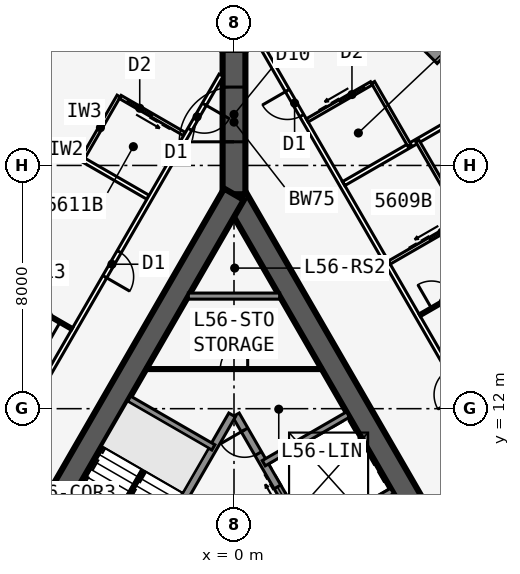
"""IFC4 building model, lengths in metres.
Left out: names, types, materials, properties, quantities, classifications, styles, units other than length and angle.
Written with IfcOpenShell. Run it as: python <this file> out.ifc"""

import sys

from ifc_helpers import new_model, si_unit, direction, frame, frame_2d, origin, place, context, subcontext, project, spatial, rectangle, extrude, element, fill, save


model = new_model("IFC4")
c1 = context("Model", 3, precision=1e-05, world=origin(), true_north=direction((0.0, 1.0)))
c2 = subcontext(c1, "Body", "Model", "MODEL_VIEW")
j1 = project(units=[si_unit("LENGTHUNIT", "METRE"), si_unit("PLANEANGLEUNIT", "RADIAN")], contexts=[c1])
p1 = place(None, origin())
s1 = spatial("IfcSite", under=j1, at=p1, CompositionType="ELEMENT")
p2 = place(p1, origin())
s2 = spatial("IfcBuilding", under=s1, at=p2, CompositionType="ELEMENT")
p3 = place(p2, frame((0.0, 0.0, 211.7)))
s3 = spatial("IfcBuildingStorey", under=s2, at=p3, CompositionType="ELEMENT", Elevation=211.7)
p4 = place(p3, frame((16.5, -9.526, 0.0), z_axis=(0.0, 0.0, 1.0), x_axis=(-0.499999749417, 0.866025548458, 0.0)))
e1 = element("IfcWall", 1, at=p4, inside=s3, PredefinedType="SHEAR", context=c2, shape_type="SweptSolid", body=[
    extrude(rectangle(XDim=33.0, YDim=0.75, at=frame_2d((16.5, 0.0))), origin(), (0.0, 0.0, 1.0), 3.6),
])
p5 = place(p4, frame((14.15, 0.0, 0.0)))
e2 = element("IfcOpeningElement", 2, at=p5, cuts=e1, PredefinedType="OPENING", context=c2, shape_type="SweptSolid", body=[
    extrude(rectangle(XDim=1.8, YDim=2.13, at=frame_2d((0.9, 1.065))), frame((0.0, 0.385, 0.0), z_axis=(0.0, -1.0, 0.0), x_axis=(1.0, 0.0, 0.0)), (0.0, 0.0, 1.0), 0.77),
])
p6 = place(p4, frame((12.6, 0.0, 0.0)))
e3 = element("IfcOpeningElement", 3, at=p6, cuts=e1, PredefinedType="OPENING", context=c2, shape_type="SweptSolid", body=[
    extrude(rectangle(XDim=1.0, YDim=2.13, at=frame_2d((0.5, 1.065))), frame((0.0, 0.385, 0.0), z_axis=(0.0, -1.0, 0.0), x_axis=(1.0, 0.0, 0.0)), (0.0, 0.0, 1.0), 0.77),
])
p7 = place(p3, frame((5.379, 2.586, 0.0), z_axis=(0.0, 0.0, 1.0), x_axis=(-0.500001375892, 0.866024609411, 0.0)))
e4 = element("IfcWall", 4, at=p7, inside=s3, PredefinedType="SOLIDWALL", context=c2, shape_type="SweptSolid", body=[
    extrude(rectangle(XDim=10.633, YDim=0.25, at=frame_2d((5.316, 0.0))), origin(), (0.0, 0.0, 1.0), 3.435),
])
p8 = place(p7, frame((9.164, 0.0, 0.0)))
e5 = element("IfcOpeningElement", 5, at=p8, cuts=e4, PredefinedType="OPENING", context=c2, shape_type="SweptSolid", body=[
    extrude(rectangle(XDim=0.9, YDim=2.13, at=frame_2d((0.45, 1.065))), frame((0.0, 0.135, 0.0), z_axis=(0.0, -1.0, 0.0), x_axis=(1.0, 0.0, 0.0)), (0.0, 0.0, 1.0), 0.27),
])
p9 = place(p7, frame((1.0, 0.0, 0.0)))
e6 = element("IfcOpeningElement", 6, at=p9, cuts=e4, PredefinedType="OPENING", context=c2, shape_type="SweptSolid", body=[
    extrude(rectangle(XDim=1.1, YDim=2.13, at=frame_2d((0.55, 1.065))), frame((0.0, 0.135, 0.0), z_axis=(0.0, -1.0, 0.0), x_axis=(1.0, 0.0, 0.0)), (0.0, 0.0, 1.0), 0.27),
])
p10 = place(p7, frame((3.9, 0.0, 0.0)))
e7 = element("IfcOpeningElement", 7, at=p10, cuts=e4, PredefinedType="OPENING", context=c2, shape_type="SweptSolid", body=[
    extrude(rectangle(XDim=1.1, YDim=2.13, at=frame_2d((0.55, 1.065))), frame((0.0, 0.135, 0.0), z_axis=(0.0, -1.0, 0.0), x_axis=(1.0, 0.0, 0.0)), (0.0, 0.0, 1.0), 0.27),
])
p11 = place(p7, frame((6.8, 0.0, 0.0)))
e8 = element("IfcOpeningElement", 8, at=p11, cuts=e4, PredefinedType="OPENING", context=c2, shape_type="SweptSolid", body=[
    extrude(rectangle(XDim=1.1, YDim=2.13, at=frame_2d((0.55, 1.065))), frame((0.0, 0.135, 0.0), z_axis=(0.0, -1.0, 0.0), x_axis=(1.0, 0.0, 0.0)), (0.0, 0.0, 1.0), 0.27),
])
for number, where, z_axis, x_axis in (
    (9, (2.429, 7.696, 0.0), (0.0, 0.0, 1.0), (0.866, 0.5, 0.0)),
    (10, (0.979, 10.207, 0.0), (0.0, 0.0, 1.0), (0.866, 0.5, 0.0)),
):
    element("IfcWall", number, at=place(p3, frame(where, z_axis=z_axis, x_axis=x_axis)), inside=s3, PredefinedType="SOLIDWALL", context=c2, shape_type="SweptSolid", body=[
        extrude(rectangle(XDim=3.2, YDim=0.2, at=frame_2d((1.6, 0.0))), origin(), (0.0, 0.0, 1.0), 3.435),
    ])
p12 = place(p3, frame((0.0, 19.052, 0.0), z_axis=(0.0, 0.0, 1.0), x_axis=(-0.499999749417, -0.866025548458, 0.0)))
e11 = element("IfcWall", 11, at=p12, inside=s3, PredefinedType="SHEAR", context=c2, shape_type="SweptSolid", body=[
    extrude(rectangle(XDim=33.0, YDim=0.75, at=frame_2d((16.5, 0.0))), origin(), (0.0, 0.0, 1.0), 3.6),
])
p13 = place(p12, frame((14.15, 0.0, 0.0)))
e12 = element("IfcOpeningElement", 12, at=p13, cuts=e11, PredefinedType="OPENING", context=c2, shape_type="SweptSolid", body=[
    extrude(rectangle(XDim=1.8, YDim=2.13, at=frame_2d((0.9, 1.065))), frame((0.0, 0.385, 0.0), z_axis=(0.0, -1.0, 0.0), x_axis=(1.0, 0.0, 0.0)), (0.0, 0.0, 1.0), 0.77),
])
p14 = place(p12, frame((12.6, 0.0, 0.0)))
e13 = element("IfcOpeningElement", 13, at=p14, cuts=e11, PredefinedType="OPENING", context=c2, shape_type="SweptSolid", body=[
    extrude(rectangle(XDim=1.0, YDim=2.13, at=frame_2d((0.5, 1.065))), frame((0.0, 0.385, 0.0), z_axis=(0.0, -1.0, 0.0), x_axis=(1.0, 0.0, 0.0)), (0.0, 0.0, 1.0), 0.77),
])
p15 = place(p3, frame((-0.062, 11.794, 0.0), z_axis=(0.0, 0.0, 1.0), x_axis=(-0.500006680225, -0.86602154692, 0.0)))
e14 = element("IfcWall", 14, at=p15, inside=s3, PredefinedType="SOLIDWALL", context=c2, shape_type="SweptSolid", body=[
    extrude(rectangle(XDim=7.733, YDim=0.25, at=frame_2d((3.866, 0.0))), origin(), (0.0, 0.0, 1.0), 3.435),
])
p16 = place(p3, frame((-0.679, 10.727, 0.0), z_axis=(0.0, 0.0, 1.0), x_axis=(-0.866008981251, 0.500028443584, 0.0)))
e15 = element("IfcWall", 15, at=p16, inside=s3, PredefinedType="SOLIDWALL", context=c2, shape_type="SweptSolid", body=[
    extrude(rectangle(XDim=3.2, YDim=0.2, at=frame_2d((1.6, 0.0))), origin(), (0.0, 0.0, 1.0), 3.435),
])
p17 = place(p3, frame((0.0, 19.052, 0.0), z_axis=(0.0, 0.0, 1.0), x_axis=(0.0, 1.0, 0.0)))
e16 = element("IfcWall", 16, at=p17, inside=s3, PredefinedType="SHEAR", context=c2, shape_type="SweptSolid", body=[
    extrude(rectangle(XDim=4.746, YDim=0.75, at=frame_2d((2.373, 0.0))), origin(), (0.0, 0.0, 1.0), 3.6),
])
p18 = place(p17, frame((1.725, 0.0, 0.0)))
e17 = element("IfcOpeningElement", 17, at=p18, cuts=e16, PredefinedType="OPENING", context=c2, shape_type="SweptSolid", body=[
    extrude(rectangle(XDim=1.8, YDim=2.13, at=frame_2d((0.9, 1.065))), frame((0.0, 0.385, 0.0), z_axis=(0.0, -1.0, 0.0), x_axis=(1.0, 0.0, 0.0)), (0.0, 0.0, 1.0), 0.77),
])
p19 = place(p3, frame((6.841, 23.512, 0.0), z_axis=(0.0, 0.0, 1.0), x_axis=(-0.707106781187, 0.707106781187, 0.0)))
e18 = element("IfcWall", 18, at=p19, inside=s3, PredefinedType="SOLIDWALL", context=c2, shape_type="SweptSolid", body=[
    extrude(rectangle(XDim=4.184, YDim=0.45, at=frame_2d((2.092, 0.0))), origin(), (0.0, 0.0, 1.0), 3.435),
])
p20 = place(p19, frame((0.592, 0.0, 0.45)))
e19 = element("IfcOpeningElement", 19, at=p20, cuts=e18, PredefinedType="OPENING", context=c2, shape_type="SweptSolid", body=[
    extrude(rectangle(XDim=3.0, YDim=2.6, at=frame_2d((1.5, 1.3))), frame((0.0, 0.235, 0.0), z_axis=(0.0, -1.0, 0.0), x_axis=(1.0, 0.0, 0.0)), (0.0, 0.0, 1.0), 0.47),
])
p21 = place(p3, frame((-3.882, 26.471, 0.0), z_axis=(0.0, 0.0, 1.0), x_axis=(-0.707106781187, -0.707106781187, 0.0)))
e20 = element("IfcWall", 20, at=p21, inside=s3, PredefinedType="SOLIDWALL", context=c2, shape_type="SweptSolid", body=[
    extrude(rectangle(XDim=4.184, YDim=0.45, at=frame_2d((2.092, 0.0))), origin(), (0.0, 0.0, 1.0), 3.435),
])
p22 = place(p21, frame((0.592, 0.0, 0.45)))
e21 = element("IfcOpeningElement", 21, at=p22, cuts=e20, PredefinedType="OPENING", context=c2, shape_type="SweptSolid", body=[
    extrude(rectangle(XDim=3.0, YDim=2.6, at=frame_2d((1.5, 1.3))), frame((0.0, 0.235, 0.0), z_axis=(0.0, -1.0, 0.0), x_axis=(1.0, 0.0, 0.0)), (0.0, 0.0, 1.0), 0.47),
])
p23 = place(p3, frame((21.661, -12.015, 0.0), z_axis=(0.0, 0.0, 1.0), x_axis=(-0.500000605707, 0.866025054079, 0.0)))
e22 = element("IfcWall", 22, at=p23, inside=s3, PredefinedType="PARTITIONING", context=c2, shape_type="SweptSolid", body=[
    extrude(rectangle(XDim=42.472, YDim=0.15, at=frame_2d((21.236, 0.0))), origin(), (0.0, 0.0, 1.0), 3.435),
])
p24 = place(p23, frame((2.661, 0.0, 0.0)))
e23 = element("IfcOpeningElement", 23, at=p24, cuts=e22, PredefinedType="OPENING", context=c2, shape_type="SweptSolid", body=[
    extrude(rectangle(XDim=0.95, YDim=2.13, at=frame_2d((0.475, 1.065))), frame((0.0, 0.085, 0.0), z_axis=(0.0, -1.0, 0.0), x_axis=(1.0, 0.0, 0.0)), (0.0, 0.0, 1.0), 0.17),
])
p25 = place(p23, frame((7.061, 0.0, 0.0)))
e24 = element("IfcOpeningElement", 24, at=p25, cuts=e22, PredefinedType="OPENING", context=c2, shape_type="SweptSolid", body=[
    extrude(rectangle(XDim=0.95, YDim=2.13, at=frame_2d((0.475, 1.065))), frame((0.0, 0.085, 0.0), z_axis=(0.0, -1.0, 0.0), x_axis=(1.0, 0.0, 0.0)), (0.0, 0.0, 1.0), 0.17),
])
p26 = place(p23, frame((13.861, 0.0, 0.0)))
e25 = element("IfcOpeningElement", 25, at=p26, cuts=e22, PredefinedType="OPENING", context=c2, shape_type="SweptSolid", body=[
    extrude(rectangle(XDim=0.95, YDim=2.13, at=frame_2d((0.475, 1.065))), frame((0.0, 0.085, 0.0), z_axis=(0.0, -1.0, 0.0), x_axis=(1.0, 0.0, 0.0)), (0.0, 0.0, 1.0), 0.17),
])
p27 = place(p23, frame((22.061, 0.0, 0.0)))
e26 = element("IfcOpeningElement", 26, at=p27, cuts=e22, PredefinedType="OPENING", context=c2, shape_type="SweptSolid", body=[
    extrude(rectangle(XDim=0.95, YDim=2.13, at=frame_2d((0.475, 1.065))), frame((0.0, 0.085, 0.0), z_axis=(0.0, -1.0, 0.0), x_axis=(1.0, 0.0, 0.0)), (0.0, 0.0, 1.0), 0.17),
])
p28 = place(p23, frame((28.261, 0.0, 0.0)))
e27 = element("IfcOpeningElement", 27, at=p28, cuts=e22, PredefinedType="OPENING", context=c2, shape_type="SweptSolid", body=[
    extrude(rectangle(XDim=0.95, YDim=2.13, at=frame_2d((0.475, 1.065))), frame((0.0, 0.085, 0.0), z_axis=(0.0, -1.0, 0.0), x_axis=(1.0, 0.0, 0.0)), (0.0, 0.0, 1.0), 0.17),
])
p29 = place(p23, frame((38.861, 0.0, 0.0)))
e28 = element("IfcOpeningElement", 28, at=p29, cuts=e22, PredefinedType="OPENING", context=c2, shape_type="SweptSolid", body=[
    extrude(rectangle(XDim=0.95, YDim=2.13, at=frame_2d((0.475, 1.065))), frame((0.0, 0.085, 0.0), z_axis=(0.0, -1.0, 0.0), x_axis=(1.0, 0.0, 0.0)), (0.0, 0.0, 1.0), 0.17),
])
p30 = place(p3, frame((6.108, 15.073, 0.0), z_axis=(0.0, 0.0, 1.0), x_axis=(0.866035028144, 0.499983329749, 0.0)))
e29 = element("IfcWall", 29, at=p30, inside=s3, PredefinedType="PARTITIONING", context=c2, shape_type="SweptSolid", body=[
    extrude(rectangle(XDim=6.373, YDim=0.1, at=frame_2d((3.187, 0.0))), origin(), (0.0, 0.0, 1.0), 2.589),
])
p31 = place(p30, frame((0.45, 0.0, 0.0)))
e30 = element("IfcOpeningElement", 30, at=p31, cuts=e29, PredefinedType="OPENING", context=c2, shape_type="SweptSolid", body=[
    extrude(rectangle(XDim=0.9, YDim=2.13, at=frame_2d((0.45, 1.065))), frame((0.0, 0.06, 0.0), z_axis=(0.0, -1.0, 0.0), x_axis=(1.0, 0.0, 0.0)), (0.0, 0.0, 1.0), 0.12),
])
p32 = place(p3, frame((3.608, 19.404, 0.0), z_axis=(0.0, 0.0, 1.0), x_axis=(0.866028745538, 0.499994211868, 0.0)))
e31 = element("IfcWall", 31, at=p32, inside=s3, PredefinedType="PARTITIONING", context=c2, shape_type="SweptSolid", body=[
    extrude(rectangle(XDim=5.34, YDim=0.15, at=frame_2d((2.67, 0.0))), origin(), (0.0, 0.0, 1.0), 2.589),
])
p33 = place(p3, frame((7.533, 18.205, 0.0), z_axis=(0.0, 0.0, 1.0), x_axis=(-0.499990139034, 0.866031096941, 0.0)))
e32 = element("IfcWall", 32, at=p33, inside=s3, PredefinedType="PLUMBINGWALL", context=c2, shape_type="SweptSolid", body=[
    extrude(rectangle(XDim=3.0, YDim=0.12, at=frame_2d((1.5, 0.0))), origin(), (0.0, 0.0, 1.0), 3.435),
])
p34 = place(p3, frame((5.108, 16.805, 0.0), z_axis=(0.0, 0.0, 1.0), x_axis=(0.866035715982, 0.499982138324, 0.0)))
e33 = element("IfcWall", 33, at=p34, inside=s3, PredefinedType="PLUMBINGWALL", context=c2, shape_type="SweptSolid", body=[
    extrude(rectangle(XDim=2.74, YDim=0.12, at=frame_2d((1.37, 0.0))), origin(), (0.0, 0.0, 1.0), 3.435),
])
p35 = place(p34, frame((1.55, 0.0, 0.0)))
e34 = element("IfcOpeningElement", 34, at=p35, cuts=e33, PredefinedType="OPENING", context=c2, shape_type="SweptSolid", body=[
    extrude(rectangle(XDim=0.9, YDim=2.13, at=frame_2d((0.45, 1.065))), frame((0.0, 0.07, 0.0), z_axis=(0.0, -1.0, 0.0), x_axis=(1.0, 0.0, 0.0)), (0.0, 0.0, 1.0), 0.14),
])
p36 = place(p3, frame((5.773, 20.654, 0.0), z_axis=(0.0, 0.0, 1.0), x_axis=(-0.500001309137, 0.866024647952, 0.0)))
e35 = element("IfcWall", 35, at=p36, inside=s3, PredefinedType="PLUMBINGWALL", context=c2, shape_type="SweptSolid", body=[
    extrude(rectangle(XDim=2.4, YDim=0.12, at=frame_2d((1.2, 0.0))), origin(), (0.0, 0.0, 1.0), 3.435),
])
p37 = place(p3, frame((2.408, 21.482, 0.0), z_axis=(0.0, 0.0, 1.0), x_axis=(0.866023955769, 0.500002508028, 0.0)))
e36 = element("IfcWall", 36, at=p37, inside=s3, PredefinedType="PLUMBINGWALL", context=c2, shape_type="SweptSolid", body=[
    extrude(rectangle(XDim=2.44, YDim=0.12, at=frame_2d((1.22, 0.0))), origin(), (0.0, 0.0, 1.0), 3.435),
])
p38 = place(p37, frame((1.25, 0.0, 0.0)))
e37 = element("IfcOpeningElement", 37, at=p38, cuts=e36, PredefinedType="OPENING", context=c2, shape_type="SweptSolid", body=[
    extrude(rectangle(XDim=0.9, YDim=2.13, at=frame_2d((0.45, 1.065))), frame((0.0, 0.07, 0.0), z_axis=(0.0, -1.0, 0.0), x_axis=(1.0, 0.0, 0.0)), (0.0, 0.0, 1.0), 0.14),
])
p39 = place(p3, frame((-0.425, 22.966, 0.0), z_axis=(0.0, 0.0, 1.0), x_axis=(-0.500000265775, -0.866025250339, 0.0)))
e38 = element("IfcWall", 38, at=p39, inside=s3, PredefinedType="PARTITIONING", context=c2, shape_type="SweptSolid", body=[
    extrude(rectangle(XDim=39.354, YDim=0.15, at=frame_2d((19.677, 0.0))), origin(), (0.0, 0.0, 1.0), 3.435),
])
p40 = place(p39, frame((1.102, 0.0, 0.0)))
e39 = element("IfcOpeningElement", 39, at=p40, cuts=e38, PredefinedType="OPENING", context=c2, shape_type="SweptSolid", body=[
    extrude(rectangle(XDim=0.95, YDim=2.13, at=frame_2d((0.475, 1.065))), frame((0.0, 0.085, 0.0), z_axis=(0.0, -1.0, 0.0), x_axis=(1.0, 0.0, 0.0)), (0.0, 0.0, 1.0), 0.17),
])
p41 = place(p39, frame((6.702, 0.0, 0.0)))
e40 = element("IfcOpeningElement", 40, at=p41, cuts=e38, PredefinedType="OPENING", context=c2, shape_type="SweptSolid", body=[
    extrude(rectangle(XDim=0.95, YDim=2.13, at=frame_2d((0.475, 1.065))), frame((0.0, 0.085, 0.0), z_axis=(0.0, -1.0, 0.0), x_axis=(1.0, 0.0, 0.0)), (0.0, 0.0, 1.0), 0.17),
])
p42 = place(p39, frame((16.702, 0.0, 0.0)))
e41 = element("IfcOpeningElement", 41, at=p42, cuts=e38, PredefinedType="OPENING", context=c2, shape_type="SweptSolid", body=[
    extrude(rectangle(XDim=0.95, YDim=2.13, at=frame_2d((0.475, 1.065))), frame((0.0, 0.085, 0.0), z_axis=(0.0, -1.0, 0.0), x_axis=(1.0, 0.0, 0.0)), (0.0, 0.0, 1.0), 0.17),
])
p43 = place(p39, frame((26.102, 0.0, 0.0)))
e42 = element("IfcOpeningElement", 42, at=p43, cuts=e38, PredefinedType="OPENING", context=c2, shape_type="SweptSolid", body=[
    extrude(rectangle(XDim=0.95, YDim=2.13, at=frame_2d((0.475, 1.065))), frame((0.0, 0.085, 0.0), z_axis=(0.0, -1.0, 0.0), x_axis=(1.0, 0.0, 0.0)), (0.0, 0.0, 1.0), 0.17),
])
p44 = place(p39, frame((32.302, 0.0, 0.0)))
e43 = element("IfcOpeningElement", 43, at=p44, cuts=e38, PredefinedType="OPENING", context=c2, shape_type="SweptSolid", body=[
    extrude(rectangle(XDim=0.95, YDim=2.13, at=frame_2d((0.475, 1.065))), frame((0.0, 0.085, 0.0), z_axis=(0.0, -1.0, 0.0), x_axis=(1.0, 0.0, 0.0)), (0.0, 0.0, 1.0), 0.17),
])
p45 = place(p39, frame((37.302, 0.0, 0.0)))
e44 = element("IfcOpeningElement", 44, at=p45, cuts=e38, PredefinedType="OPENING", context=c2, shape_type="SweptSolid", body=[
    extrude(rectangle(XDim=0.95, YDim=2.13, at=frame_2d((0.475, 1.065))), frame((0.0, 0.085, 0.0), z_axis=(0.0, -1.0, 0.0), x_axis=(1.0, 0.0, 0.0)), (0.0, 0.0, 1.0), 0.17),
])
p46 = place(p3, frame((-2.829, 18.954, 0.0), z_axis=(0.0, 0.0, 1.0), x_axis=(-0.866026604282, 0.499997920671, 0.0)))
e45 = element("IfcWall", 45, at=p46, inside=s3, PredefinedType="PARTITIONING", context=c2, shape_type="SweptSolid", body=[
    extrude(rectangle(XDim=6.24, YDim=0.15, at=frame_2d((3.12, 0.0))), origin(), (0.0, 0.0, 1.0), 2.589),
])
p47 = place(p3, frame((-5.329, 14.623, 0.0), z_axis=(0.0, 0.0, 1.0), x_axis=(-0.866017877653, 0.500013035415, 0.0)))
e46 = element("IfcWall", 46, at=p47, inside=s3, PredefinedType="PARTITIONING", context=c2, shape_type="SweptSolid", body=[
    extrude(rectangle(XDim=7.273, YDim=0.1, at=frame_2d((3.636, 0.0))), origin(), (0.0, 0.0, 1.0), 2.589),
])
p48 = place(p47, frame((0.45, 0.0, 0.0)))
e47 = element("IfcOpeningElement", 47, at=p48, cuts=e46, PredefinedType="OPENING", context=c2, shape_type="SweptSolid", body=[
    extrude(rectangle(XDim=0.9, YDim=2.13, at=frame_2d((0.45, 1.065))), frame((0.0, 0.06, 0.0), z_axis=(0.0, -1.0, 0.0), x_axis=(1.0, 0.0, 0.0)), (0.0, 0.0, 1.0), 0.12),
])
p49 = place(p3, frame((-3.793, 22.282, 0.0), z_axis=(0.0, 0.0, 1.0), x_axis=(-0.500001309137, -0.866024647952, 0.0)))
e48 = element("IfcWall", 48, at=p49, inside=s3, PredefinedType="PLUMBINGWALL", context=c2, shape_type="SweptSolid", body=[
    extrude(rectangle(XDim=2.4, YDim=0.12, at=frame_2d((1.2, 0.0))), origin(), (0.0, 0.0, 1.0), 3.435),
])
p50 = place(p3, frame((-1.628, 21.032, 0.0), z_axis=(0.0, 0.0, 1.0), x_axis=(-0.866048967903, 0.499959183527, 0.0)))
e49 = element("IfcWall", 49, at=p50, inside=s3, PredefinedType="PLUMBINGWALL", context=c2, shape_type="SweptSolid", body=[
    extrude(rectangle(XDim=2.44, YDim=0.12, at=frame_2d((1.22, 0.0))), origin(), (0.0, 0.0, 1.0), 3.435),
])
p51 = place(p50, frame((1.25, 0.0, 0.0)))
e50 = element("IfcOpeningElement", 50, at=p51, cuts=e49, PredefinedType="OPENING", context=c2, shape_type="SweptSolid", body=[
    extrude(rectangle(XDim=0.9, YDim=2.13, at=frame_2d((0.45, 1.065))), frame((0.0, 0.07, 0.0), z_axis=(0.0, -1.0, 0.0), x_axis=(1.0, 0.0, 0.0)), (0.0, 0.0, 1.0), 0.14),
])
p52 = place(p3, frame((-1.501, 15.703, 0.0), z_axis=(0.0, 0.0, 1.0), x_axis=(1.0, 0.0, 0.0)))
e51 = element("IfcWall", 51, at=p52, inside=s3, PredefinedType="SOLIDWALL", context=c2, shape_type="SweptSolid", body=[
    extrude(rectangle(XDim=3.002, YDim=0.2, at=frame_2d((1.501, 0.0))), origin(), (0.0, 0.0, 1.0), 3.435),
])
p53 = place(p3, frame((-2.887, 13.302, 0.0), z_axis=(0.0, 0.0, 1.0), x_axis=(1.0, 0.0, 0.0)))
e52 = element("IfcWall", 52, at=p53, inside=s3, PredefinedType="PARTITIONING", context=c2, shape_type="SweptSolid", body=[
    extrude(rectangle(XDim=5.773, YDim=0.1, at=frame_2d((2.887, 0.0))), origin(), (0.0, 0.0, 1.0), 3.435),
])
p54 = place(p53, frame((2.437, 0.0, 0.0)))
e53 = element("IfcOpeningElement", 53, at=p54, cuts=e52, PredefinedType="OPENING", context=c2, shape_type="SweptSolid", body=[
    extrude(rectangle(XDim=0.9, YDim=2.13, at=frame_2d((0.45, 1.065))), frame((0.0, 0.06, 0.0), z_axis=(0.0, -1.0, 0.0), x_axis=(1.0, 0.0, 0.0)), (0.0, 0.0, 1.0), 0.12),
])
p55 = place(p3, frame((-2.988, 9.978, 0.0), z_axis=(0.0, 0.0, 1.0), x_axis=(-0.499992232847, -0.866029888106, 0.0)))
e54 = element("IfcWall", 54, at=p55, inside=s3, PredefinedType="SOLIDWALL", context=c2, shape_type="SweptSolid", body=[
    extrude(rectangle(XDim=2.794, YDim=0.1, at=frame_2d((1.397, 0.0))), origin(), (0.0, 0.0, 1.0), 3.6),
])
p56 = place(p31, origin())
e55 = element("IfcDoor", 55, at=p56, inside=s3, OperationType="SINGLE_SWING_LEFT", PredefinedType="DOOR", context=c2, shape_type="SweptSolid", body=[
    extrude(rectangle(XDim=0.9, YDim=2.13, at=frame_2d((0.45, 1.065))), frame((0.0, 0.025, 0.0), z_axis=(0.0, -1.0, 0.0), x_axis=(1.0, 0.0, 0.0)), (0.0, 0.0, 1.0), 0.05),
])
fill(e30, e55)
p57 = place(p35, origin())
e56 = element("IfcDoor", 56, at=p57, inside=s3, OperationType="SLIDING_TO_LEFT", PredefinedType="DOOR", context=c2, shape_type="SweptSolid", body=[
    extrude(rectangle(XDim=0.9, YDim=2.13, at=frame_2d((0.45, 1.065))), frame((0.0, 0.025, 0.0), z_axis=(0.0, -1.0, 0.0), x_axis=(1.0, 0.0, 0.0)), (0.0, 0.0, 1.0), 0.05),
])
fill(e34, e56)
p58 = place(p38, origin())
e57 = element("IfcDoor", 57, at=p58, inside=s3, OperationType="SLIDING_TO_LEFT", PredefinedType="DOOR", context=c2, shape_type="SweptSolid", body=[
    extrude(rectangle(XDim=0.9, YDim=2.13, at=frame_2d((0.45, 1.065))), frame((0.0, 0.025, 0.0), z_axis=(0.0, -1.0, 0.0), x_axis=(1.0, 0.0, 0.0)), (0.0, 0.0, 1.0), 0.05),
])
fill(e37, e57)
p59 = place(p29, origin())
e58 = element("IfcDoor", 58, at=p59, inside=s3, OperationType="SINGLE_SWING_RIGHT", PredefinedType="DOOR", context=c2, shape_type="SweptSolid", body=[
    extrude(rectangle(XDim=0.95, YDim=2.13, at=frame_2d((0.475, 1.065))), frame((0.0, 0.025, 0.0), z_axis=(0.0, -1.0, 0.0), x_axis=(1.0, 0.0, 0.0)), (0.0, 0.0, 1.0), 0.05),
])
fill(e28, e58)
p60 = place(p48, origin())
e59 = element("IfcDoor", 59, at=p60, inside=s3, OperationType="SINGLE_SWING_LEFT", PredefinedType="DOOR", context=c2, shape_type="SweptSolid", body=[
    extrude(rectangle(XDim=0.9, YDim=2.13, at=frame_2d((0.45, 1.065))), frame((0.0, 0.025, 0.0), z_axis=(0.0, -1.0, 0.0), x_axis=(1.0, 0.0, 0.0)), (0.0, 0.0, 1.0), 0.05),
])
fill(e47, e59)
p61 = place(p51, origin())
e60 = element("IfcDoor", 60, at=p61, inside=s3, OperationType="SLIDING_TO_LEFT", PredefinedType="DOOR", context=c2, shape_type="SweptSolid", body=[
    extrude(rectangle(XDim=0.9, YDim=2.13, at=frame_2d((0.45, 1.065))), frame((0.0, 0.025, 0.0), z_axis=(0.0, -1.0, 0.0), x_axis=(1.0, 0.0, 0.0)), (0.0, 0.0, 1.0), 0.05),
])
fill(e50, e60)
p62 = place(p40, origin())
e61 = element("IfcDoor", 61, at=p62, inside=s3, OperationType="SINGLE_SWING_LEFT", PredefinedType="DOOR", context=c2, shape_type="SweptSolid", body=[
    extrude(rectangle(XDim=0.95, YDim=2.13, at=frame_2d((0.475, 1.065))), frame((0.0, 0.025, 0.0), z_axis=(0.0, -1.0, 0.0), x_axis=(1.0, 0.0, 0.0)), (0.0, 0.0, 1.0), 0.05),
])
fill(e39, e61)
p63 = place(p41, origin())
e62 = element("IfcDoor", 62, at=p63, inside=s3, OperationType="SINGLE_SWING_RIGHT", PredefinedType="DOOR", context=c2, shape_type="SweptSolid", body=[
    extrude(rectangle(XDim=0.95, YDim=2.13, at=frame_2d((0.475, 1.065))), frame((0.0, 0.025, 0.0), z_axis=(0.0, -1.0, 0.0), x_axis=(1.0, 0.0, 0.0)), (0.0, 0.0, 1.0), 0.05),
])
fill(e40, e62)
p64 = place(p18, origin())
e63 = element("IfcDoor", 63, at=p64, inside=s3, OperationType="DOUBLE_DOOR_DOUBLE_SWING", PredefinedType="DOOR", context=c2, shape_type="SweptSolid", body=[
    extrude(rectangle(XDim=1.8, YDim=2.13, at=frame_2d((0.9, 1.065))), frame((0.0, 0.025, 0.0), z_axis=(0.0, -1.0, 0.0), x_axis=(1.0, 0.0, 0.0)), (0.0, 0.0, 1.0), 0.05),
])
fill(e17, e63)
p65 = place(p54, origin())
e64 = element("IfcDoor", 64, at=p65, inside=s3, OperationType="SINGLE_SWING_RIGHT", PredefinedType="DOOR", context=c2, shape_type="SweptSolid", body=[
    extrude(rectangle(XDim=0.9, YDim=2.13, at=frame_2d((0.45, 1.065))), frame((0.0, 0.025, 0.0), z_axis=(0.0, -1.0, 0.0), x_axis=(1.0, 0.0, 0.0)), (0.0, 0.0, 1.0), 0.05),
])
fill(e53, e64)
p66 = place(p8, origin())
e65 = element("IfcDoor", 65, at=p66, inside=s3, OperationType="SINGLE_SWING_RIGHT", PredefinedType="DOOR", context=c2, shape_type="SweptSolid", body=[
    extrude(rectangle(XDim=0.9, YDim=2.13, at=frame_2d((0.45, 1.065))), frame((0.0, 0.025, 0.0), z_axis=(0.0, -1.0, 0.0), x_axis=(1.0, 0.0, 0.0)), (0.0, 0.0, 1.0), 0.05),
])
fill(e5, e65)
p67 = place(p11, origin())
e66 = element("IfcDoor", 66, at=p67, inside=s3, OperationType="DOUBLE_DOOR_SLIDING", PredefinedType="USERDEFINED", context=c2, shape_type="SweptSolid", body=[
    extrude(rectangle(XDim=1.1, YDim=2.13, at=frame_2d((0.55, 1.065))), frame((0.0, 0.025, 0.0), z_axis=(0.0, -1.0, 0.0), x_axis=(1.0, 0.0, 0.0)), (0.0, 0.0, 1.0), 0.05),
])
fill(e8, e66)
save(model, sys.argv[1])
